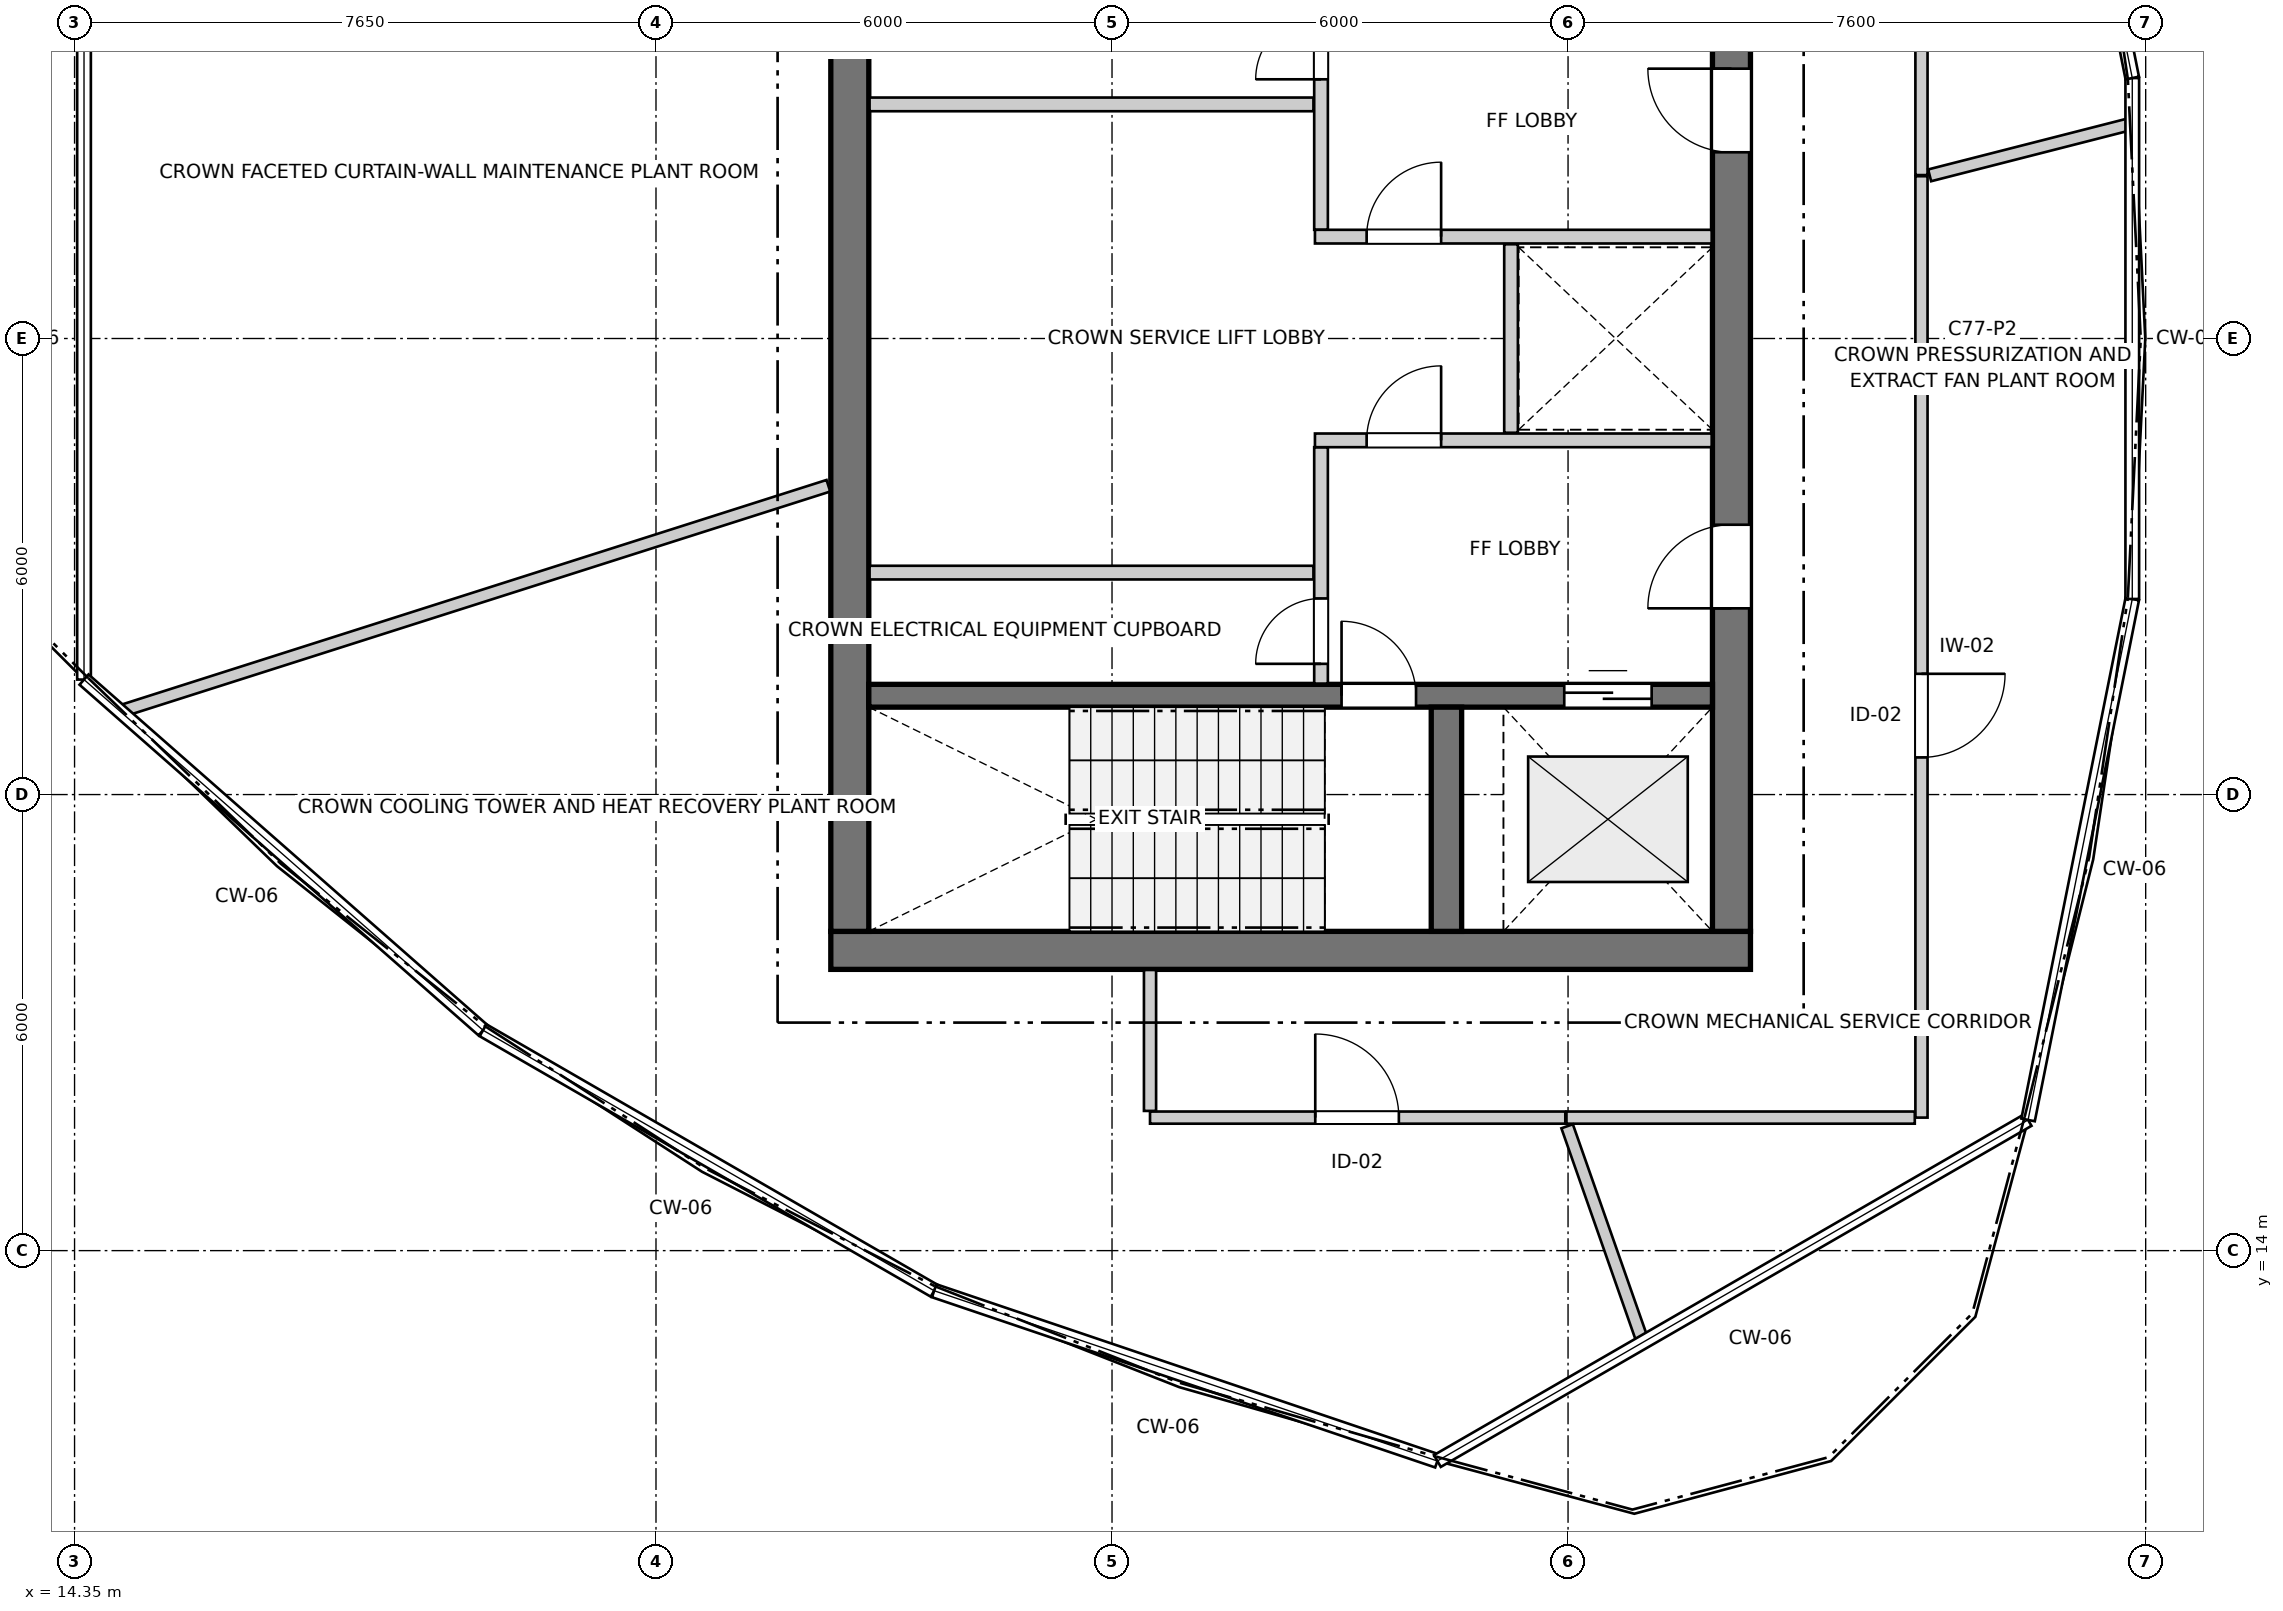
"""IFC4 building model, lengths in metres.
Left out: names, types, materials, properties, quantities, classifications, styles, units other than length and angle.
Written with IfcOpenShell. Run it as: python <this file> out.ifc"""

import sys

from ifc_helpers import new_model, si_unit, direction, frame, frame_2d, origin, place, context, subcontext, project, spatial, rectangle, extrude, source, transform, mapped, element, fill, save


model = new_model("IFC4")
c1 = context("Model", 3, precision=1e-05, world=origin(), true_north=direction((0.0, 1.0)))
c2 = subcontext(c1, "Body", "Model", "MODEL_VIEW")
j1 = project(units=[si_unit("LENGTHUNIT", "METRE"), si_unit("PLANEANGLEUNIT", "RADIAN")], contexts=[c1])
p1 = place(None, origin())
s1 = spatial("IfcSite", under=j1, at=p1, CompositionType="ELEMENT")
p2 = place(p1, origin())
s2 = spatial("IfcBuilding", under=s1, at=p2, CompositionType="ELEMENT")
p3 = place(p2, frame((0.0, 0.0, 257.5)))
s3 = spatial("IfcBuildingStorey", under=s2, at=p3, CompositionType="ELEMENT", Elevation=257.5)
p4 = place(p3, frame((24.3, 17.95, 0.0), z_axis=(0.0, 0.0, 1.0), x_axis=(1.0, 0.0, 0.0)))
e1 = element("IfcWall", 1, at=p4, inside=s3, PredefinedType="SHEAR", context=c2, shape_type="SweptSolid", body=[
    extrude(rectangle(XDim=12.1, YDim=0.5, at=frame_2d((6.05, 0.0))), origin(), (0.0, 0.0, 1.0), 4.05),
])
p5 = place(p3, frame((24.55, 33.8, 0.0), z_axis=(0.0, 0.0, 1.0), x_axis=(0.0, -1.0, 0.0)))
e2 = element("IfcWall", 2, at=p5, inside=s3, PredefinedType="SHEAR", context=c2, shape_type="SweptSolid", body=[
    extrude(rectangle(XDim=15.6, YDim=0.5, at=frame_2d((7.8, 0.0))), origin(), (0.0, 0.0, 1.0), 4.05),
])
p6 = place(p3, frame((36.15, 18.2, 0.0), z_axis=(0.0, 0.0, 1.0), x_axis=(0.0, 1.0, 0.0)))
e3 = element("IfcWall", 3, at=p6, inside=s3, PredefinedType="SHEAR", context=c2, shape_type="SweptSolid", body=[
    extrude(rectangle(XDim=15.6, YDim=0.5, at=frame_2d((7.8, 0.0))), origin(), (0.0, 0.0, 1.0), 4.05),
])
p7 = place(p6, frame((4.25, 0.0, 0.0)))
e4 = element("IfcOpeningElement", 4, at=p7, cuts=e3, PredefinedType="OPENING", context=c2, shape_type="SweptSolid", body=[
    extrude(rectangle(XDim=1.1, YDim=2.15, at=frame_2d((0.55, 1.075))), frame((0.0, 0.26, 0.0), z_axis=(0.0, -1.0, 0.0), x_axis=(1.0, 0.0, 0.0)), (0.0, 0.0, 1.0), 0.52),
])
p8 = place(p6, frame((10.25, 0.0, 0.0)))
e5 = element("IfcOpeningElement", 5, at=p8, cuts=e3, PredefinedType="OPENING", context=c2, shape_type="SweptSolid", body=[
    extrude(rectangle(XDim=1.1, YDim=2.15, at=frame_2d((0.55, 1.075))), frame((0.0, 0.26, 0.0), z_axis=(0.0, -1.0, 0.0), x_axis=(1.0, 0.0, 0.0)), (0.0, 0.0, 1.0), 0.52),
])
p9 = place(p3, frame((24.8, 21.3, 0.0), z_axis=(0.0, 0.0, 1.0), x_axis=(1.0, 0.0, 0.0)))
e6 = element("IfcWall", 6, at=p9, inside=s3, PredefinedType="SHEAR", context=c2, shape_type="SweptSolid", body=[
    extrude(rectangle(XDim=11.1, YDim=0.3, at=frame_2d((5.55, 0.0))), origin(), (0.0, 0.0, 1.0), 4.05),
])
p10 = place(p9, frame((6.22, 0.0, 0.0)))
e7 = element("IfcOpeningElement", 7, at=p10, cuts=e6, PredefinedType="OPENING", context=c2, shape_type="SweptSolid", body=[
    extrude(rectangle(XDim=0.98, YDim=2.15, at=frame_2d((0.49, 1.075))), frame((0.0, 0.16, 0.0), z_axis=(0.0, -1.0, 0.0), x_axis=(1.0, 0.0, 0.0)), (0.0, 0.0, 1.0), 0.32),
])
p11 = place(p9, frame((9.15, 0.0, 0.0)))
e8 = element("IfcOpeningElement", 8, at=p11, cuts=e6, PredefinedType="OPENING", context=c2, shape_type="SweptSolid", body=[
    extrude(rectangle(XDim=1.15, YDim=2.15, at=frame_2d((0.575, 1.075))), frame((0.0, 0.16, 0.0), z_axis=(0.0, -1.0, 0.0), x_axis=(1.0, 0.0, 0.0)), (0.0, 0.0, 1.0), 0.32),
])
p12 = place(p3, frame((32.4, 18.2, 0.0), z_axis=(0.0, 0.0, 1.0), x_axis=(0.0, 1.0, 0.0)))
e9 = element("IfcWall", 9, at=p12, inside=s3, PredefinedType="SHEAR", context=c2, shape_type="SweptSolid", body=[
    extrude(rectangle(XDim=2.95, YDim=0.4, at=frame_2d((1.475, 0.0))), origin(), (0.0, 0.0, 1.0), 4.05),
])
p13 = place(p3, frame((30.75, 21.46, 0.0), z_axis=(0.0, 0.0, 1.0), x_axis=(0.0, 1.0, 0.0)))
e10 = element("IfcWall", 10, at=p13, inside=s3, PredefinedType="PARTITIONING", context=c2, shape_type="SweptSolid", body=[
    extrude(rectangle(XDim=3.11, YDim=0.18, at=frame_2d((1.555, 0.0))), origin(), (0.0, 0.0, 1.0), 4.05),
])
p14 = place(p13, frame((0.26, 0.0, 0.0)))
e11 = element("IfcOpeningElement", 11, at=p14, cuts=e10, PredefinedType="OPENING", context=c2, shape_type="SweptSolid", body=[
    extrude(rectangle(XDim=0.86, YDim=2.05, at=frame_2d((0.43, 1.025))), frame((0.0, 0.1, 0.0), z_axis=(0.0, -1.0, 0.0), x_axis=(1.0, 0.0, 0.0)), (0.0, 0.0, 1.0), 0.2),
])
p15 = place(p3, frame((30.67, 24.66, 0.0), z_axis=(0.0, 0.0, 1.0), x_axis=(1.0, 0.0, 0.0)))
e12 = element("IfcWall", 12, at=p15, inside=s3, PredefinedType="PARTITIONING", context=c2, shape_type="SweptSolid", body=[
    extrude(rectangle(XDim=5.22, YDim=0.18, at=frame_2d((2.61, 0.0))), origin(), (0.0, 0.0, 1.0), 4.05),
])
p16 = place(p15, frame((0.68, 0.0, 0.0)))
e13 = element("IfcOpeningElement", 13, at=p16, cuts=e12, PredefinedType="OPENING", context=c2, shape_type="SweptSolid", body=[
    extrude(rectangle(XDim=0.98, YDim=2.15, at=frame_2d((0.49, 1.075))), frame((0.0, 0.1, 0.0), z_axis=(0.0, -1.0, 0.0), x_axis=(1.0, 0.0, 0.0)), (0.0, 0.0, 1.0), 0.2),
])
p17 = place(p3, frame((30.75, 27.43, 0.0), z_axis=(0.0, 0.0, 1.0), x_axis=(0.0, 1.0, 0.0)))
e14 = element("IfcWall", 14, at=p17, inside=s3, PredefinedType="PARTITIONING", context=c2, shape_type="SweptSolid", body=[
    extrude(rectangle(XDim=3.11, YDim=0.18, at=frame_2d((1.555, 0.0))), origin(), (0.0, 0.0, 1.0), 4.05),
])
p18 = place(p17, frame((1.98, 0.0, 0.0)))
e15 = element("IfcOpeningElement", 15, at=p18, cuts=e14, PredefinedType="OPENING", context=c2, shape_type="SweptSolid", body=[
    extrude(rectangle(XDim=0.86, YDim=2.05, at=frame_2d((0.43, 1.025))), frame((0.0, 0.1, 0.0), z_axis=(0.0, -1.0, 0.0), x_axis=(1.0, 0.0, 0.0)), (0.0, 0.0, 1.0), 0.2),
])
p19 = place(p3, frame((30.67, 27.34, 0.0), z_axis=(0.0, 0.0, 1.0), x_axis=(1.0, 0.0, 0.0)))
e16 = element("IfcWall", 16, at=p19, inside=s3, PredefinedType="PARTITIONING", context=c2, shape_type="SweptSolid", body=[
    extrude(rectangle(XDim=5.22, YDim=0.18, at=frame_2d((2.61, 0.0))), origin(), (0.0, 0.0, 1.0), 4.05),
])
p20 = place(p19, frame((0.68, 0.0, 0.0)))
e17 = element("IfcOpeningElement", 17, at=p20, cuts=e16, PredefinedType="OPENING", context=c2, shape_type="SweptSolid", body=[
    extrude(rectangle(XDim=0.98, YDim=2.15, at=frame_2d((0.49, 1.075))), frame((0.0, 0.1, 0.0), z_axis=(0.0, -1.0, 0.0), x_axis=(1.0, 0.0, 0.0)), (0.0, 0.0, 1.0), 0.2),
])
p21 = place(p3, frame((33.25, 24.76, 0.0), z_axis=(0.0, 0.0, 1.0), x_axis=(0.0, 1.0, 0.0)))
e18 = element("IfcWall", 18, at=p21, inside=s3, PredefinedType="PARTITIONING", context=c2, shape_type="SweptSolid", body=[
    extrude(rectangle(XDim=2.48, YDim=0.18, at=frame_2d((1.24, 0.0))), origin(), (0.0, 0.0, 1.0), 4.05),
])
for number, where, z_axis, x_axis in (
    (19, (24.81, 22.92, 0.0), (0.0, 0.0, 1.0), (1.0, 0.0, 0.0)),
    (20, (24.81, 29.08, 0.0), (0.0, 0.0, 1.0), (1.0, 0.0, 0.0)),
):
    element("IfcWall", number, at=place(p3, frame(where, z_axis=z_axis, x_axis=x_axis)), inside=s3, PredefinedType="PARTITIONING", context=c2, shape_type="SweptSolid", body=[
        extrude(rectangle(XDim=5.84, YDim=0.18, at=frame_2d((2.92, 0.0))), origin(), (0.0, 0.0, 1.0), 4.05),
    ])
p22 = place(p3, frame((38.65, 28.135, 0.0), z_axis=(0.0, 0.0, 1.0), x_axis=(0.0, -1.0, 0.0)))
e21 = element("IfcWall", 21, at=p22, inside=s3, PredefinedType="PARTITIONING", context=c2, shape_type="SweptSolid", body=[
    extrude(rectangle(XDim=12.385, YDim=0.16, at=frame_2d((6.192, 0.0))), origin(), (0.0, 0.0, 1.0), 4.05),
])
p23 = place(p22, frame((6.546, 0.0, 0.0)))
e22 = element("IfcOpeningElement", 22, at=p23, cuts=e21, PredefinedType="OPENING", context=c2, shape_type="SweptSolid", body=[
    extrude(rectangle(XDim=1.1, YDim=2.15, at=frame_2d((0.55, 1.075))), frame((0.0, 0.09, 0.0), z_axis=(0.0, -1.0, 0.0), x_axis=(1.0, 0.0, 0.0)), (0.0, 0.0, 1.0), 0.18),
])
p24 = place(p3, frame((28.5, 15.75, 0.0), z_axis=(0.0, 0.0, 1.0), x_axis=(1.0, 0.0, 0.0)))
e23 = element("IfcWall", 23, at=p24, inside=s3, PredefinedType="PARTITIONING", context=c2, shape_type="SweptSolid", body=[
    extrude(rectangle(XDim=5.464, YDim=0.16, at=frame_2d((2.732, 0.0))), origin(), (0.0, 0.0, 1.0), 4.05),
])
p25 = place(p24, frame((2.174, 0.0, 0.0)))
e24 = element("IfcOpeningElement", 24, at=p25, cuts=e23, PredefinedType="OPENING", context=c2, shape_type="SweptSolid", body=[
    extrude(rectangle(XDim=1.1, YDim=2.15, at=frame_2d((0.55, 1.075))), frame((0.0, 0.09, 0.0), z_axis=(0.0, -1.0, 0.0), x_axis=(1.0, 0.0, 0.0)), (0.0, 0.0, 1.0), 0.18),
])
p26 = place(p3, frame((14.979, 21.103, 0.0), z_axis=(0.0, 0.0, 1.0), x_axis=(0.952804016236, 0.303586077818, 0.0)))
e25 = element("IfcWall", 25, at=p26, inside=s3, PredefinedType="PARTITIONING", context=c2, shape_type="SweptSolid", body=[
    extrude(rectangle(XDim=9.749, YDim=0.16, at=frame_2d((4.875, 0.0))), origin(), (0.0, 0.0, 1.0), 3.318),
])
p27 = place(p3, frame((38.65, 28.15, 0.0), z_axis=(0.0, 0.0, 1.0), x_axis=(0.0, 1.0, 0.0)))
e26 = element("IfcWall", 26, at=p27, inside=s3, PredefinedType="PARTITIONING", context=c2, shape_type="SweptSolid", body=[
    extrude(rectangle(XDim=8.012, YDim=0.16, at=frame_2d((4.006, 0.0))), origin(), (0.0, 0.0, 1.0), 4.05),
])
p28 = place(p3, frame((33.979, 15.75, 0.0), z_axis=(0.0, 0.0, 1.0), x_axis=(1.0, 0.0, 0.0)))
e27 = element("IfcWall", 27, at=p28, inside=s3, PredefinedType="PARTITIONING", context=c2, shape_type="SweptSolid", body=[
    extrude(rectangle(XDim=4.583, YDim=0.16, at=frame_2d((2.292, 0.0))), origin(), (0.0, 0.0, 1.0), 4.05),
])
p29 = place(p3, frame((33.988, 15.636, 0.0), z_axis=(0.0, 0.0, 1.0), x_axis=(0.331108156221, -0.943592808834, 0.0)))
e28 = element("IfcWall", 28, at=p29, inside=s3, PredefinedType="PARTITIONING", context=c2, shape_type="SweptSolid", body=[
    extrude(rectangle(XDim=2.985, YDim=0.16, at=frame_2d((1.492, 0.0))), origin(), (0.0, 0.0, 1.0), 4.05),
])
p30 = place(p3, frame((38.758, 28.146, 0.0), z_axis=(0.0, 0.0, 1.0), x_axis=(0.96888022142, 0.247530031594, 0.0)))
e29 = element("IfcWall", 29, at=p30, inside=s3, PredefinedType="PARTITIONING", context=c2, shape_type="SweptSolid", body=[
    extrude(rectangle(XDim=2.724, YDim=0.16, at=frame_2d((1.362, 0.0))), origin(), (0.0, 0.0, 1.0), 4.05),
])
p31 = place(p3, frame((28.5, 15.838, 0.0), z_axis=(0.0, 0.0, 1.0), x_axis=(0.0, 1.0, 0.0)))
e30 = element("IfcWall", 30, at=p31, inside=s3, PredefinedType="PARTITIONING", context=c2, shape_type="SweptSolid", body=[
    extrude(rectangle(XDim=1.854, YDim=0.16, at=frame_2d((0.927, 0.0))), origin(), (0.0, 0.0, 1.0), 4.05),
])
m1 = source(origin(), c2, "Body", "SweptSolid", [
    extrude(rectangle(XDim=0.98, YDim=2.15, at=frame_2d((0.49, 1.075))), frame((0.0, 0.025, 0.0), z_axis=(0.0, -1.0, 0.0), x_axis=(1.0, 0.0, 0.0)), (0.0, 0.0, 1.0), 0.05),
])
p32 = place(p10, origin())
e31 = element("IfcDoor", 31, at=p32, inside=s3, OperationType="SINGLE_SWING_LEFT", PredefinedType="DOOR", context=c2, shape_type="MappedRepresentation", body=[
    mapped(m1, transform((0.0, 0.0, 0.0), x_axis=(1.0, 0.0, 0.0), y_axis=(0.0, 1.0, 0.0), z_axis=(0.0, 0.0, 1.0), scale=1.0)),
])
fill(e7, e31)
m2 = source(origin(), c2, "Body", "SweptSolid", [
    extrude(rectangle(XDim=1.15, YDim=2.15, at=frame_2d((0.575, 1.075))), frame((0.0, 0.025, 0.0), z_axis=(0.0, -1.0, 0.0), x_axis=(1.0, 0.0, 0.0)), (0.0, 0.0, 1.0), 0.05),
])
p33 = place(p11, origin())
e32 = element("IfcDoor", 32, at=p33, inside=s3, OperationType="DOUBLE_DOOR_SLIDING", PredefinedType="DOOR", context=c2, shape_type="MappedRepresentation", body=[
    mapped(m2, transform((0.0, 0.0, 0.0), x_axis=(1.0, 0.0, 0.0), y_axis=(0.0, 1.0, 0.0), z_axis=(0.0, 0.0, 1.0), scale=1.0)),
])
fill(e8, e32)
m3 = source(origin(), c2, "Body", "SweptSolid", [
    extrude(rectangle(XDim=1.1, YDim=2.15, at=frame_2d((0.55, 1.075))), frame((0.0, 0.025, 0.0), z_axis=(0.0, -1.0, 0.0), x_axis=(1.0, 0.0, 0.0)), (0.0, 0.0, 1.0), 0.05),
])
p34 = place(p7, origin())
e33 = element("IfcDoor", 33, at=p34, inside=s3, OperationType="SINGLE_SWING_LEFT", PredefinedType="DOOR", context=c2, shape_type="MappedRepresentation", body=[
    mapped(m3, transform((0.0, 0.0, 0.0), x_axis=(1.0, 0.0, 0.0), y_axis=(0.0, 1.0, 0.0), z_axis=(0.0, 0.0, 1.0), scale=1.0)),
])
fill(e4, e33)
p35 = place(p8, origin())
e34 = element("IfcDoor", 34, at=p35, inside=s3, OperationType="SINGLE_SWING_RIGHT", PredefinedType="DOOR", context=c2, shape_type="MappedRepresentation", body=[
    mapped(m3, transform((0.0, 0.0, 0.0), x_axis=(1.0, 0.0, 0.0), y_axis=(0.0, 1.0, 0.0), z_axis=(0.0, 0.0, 1.0), scale=1.0)),
])
fill(e5, e34)
m4 = source(origin(), c2, "Body", "SweptSolid", [
    extrude(rectangle(XDim=0.86, YDim=2.05, at=frame_2d((0.43, 1.025))), frame((0.0, 0.025, 0.0), z_axis=(0.0, -1.0, 0.0), x_axis=(1.0, 0.0, 0.0)), (0.0, 0.0, 1.0), 0.05),
])
p36 = place(p14, origin())
e35 = element("IfcDoor", 35, at=p36, inside=s3, OperationType="SINGLE_SWING_LEFT", PredefinedType="DOOR", context=c2, shape_type="MappedRepresentation", body=[
    mapped(m4, transform((0.0, 0.0, 0.0), x_axis=(1.0, 0.0, 0.0), y_axis=(0.0, 1.0, 0.0), z_axis=(0.0, 0.0, 1.0), scale=1.0)),
])
fill(e11, e35)
p37 = place(p16, origin())
e36 = element("IfcDoor", 36, at=p37, inside=s3, OperationType="SINGLE_SWING_RIGHT", PredefinedType="DOOR", context=c2, shape_type="MappedRepresentation", body=[
    mapped(m1, transform((0.0, 0.0, 0.0), x_axis=(1.0, 0.0, 0.0), y_axis=(0.0, 1.0, 0.0), z_axis=(0.0, 0.0, 1.0), scale=1.0)),
])
fill(e13, e36)
p38 = place(p18, origin())
e37 = element("IfcDoor", 37, at=p38, inside=s3, OperationType="SINGLE_SWING_LEFT", PredefinedType="DOOR", context=c2, shape_type="MappedRepresentation", body=[
    mapped(m4, transform((0.0, 0.0, 0.0), x_axis=(1.0, 0.0, 0.0), y_axis=(0.0, 1.0, 0.0), z_axis=(0.0, 0.0, 1.0), scale=1.0)),
])
fill(e15, e37)
p39 = place(p20, origin())
e38 = element("IfcDoor", 38, at=p39, inside=s3, OperationType="SINGLE_SWING_RIGHT", PredefinedType="DOOR", context=c2, shape_type="MappedRepresentation", body=[
    mapped(m1, transform((0.0, 0.0, 0.0), x_axis=(1.0, 0.0, 0.0), y_axis=(0.0, 1.0, 0.0), z_axis=(0.0, 0.0, 1.0), scale=1.0)),
])
fill(e17, e38)
p40 = place(p23, origin())
e39 = element("IfcDoor", 39, at=p40, inside=s3, OperationType="SINGLE_SWING_LEFT", PredefinedType="DOOR", context=c2, shape_type="MappedRepresentation", body=[
    mapped(m3, transform((0.0, 0.0, 0.0), x_axis=(1.0, 0.0, 0.0), y_axis=(0.0, 1.0, 0.0), z_axis=(0.0, 0.0, 1.0), scale=1.0)),
])
fill(e22, e39)
p41 = place(p25, origin())
e40 = element("IfcDoor", 40, at=p41, inside=s3, OperationType="SINGLE_SWING_LEFT", PredefinedType="DOOR", context=c2, shape_type="MappedRepresentation", body=[
    mapped(m3, transform((0.0, 0.0, 0.0), x_axis=(1.0, 0.0, 0.0), y_axis=(0.0, 1.0, 0.0), z_axis=(0.0, 0.0, 1.0), scale=1.0)),
])
fill(e24, e40)
save(model, sys.argv[1])
